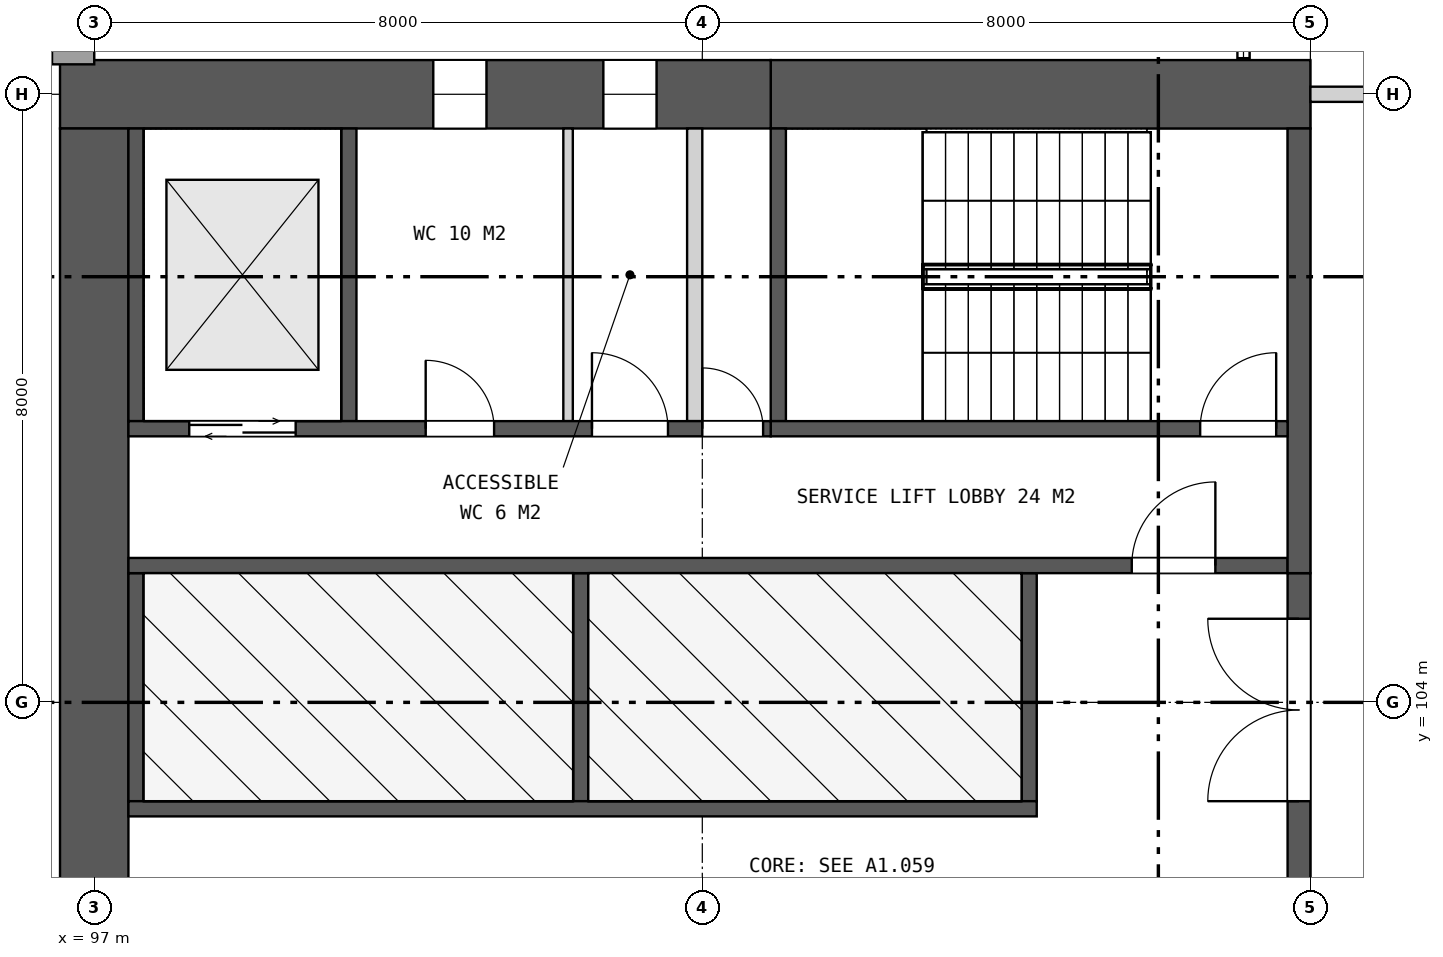
"""IFC4 building model, lengths in metres.
Left out: names, types, materials, properties, quantities, classifications, styles, units other than length and angle.
Written with IfcOpenShell. Run it as: python <this file> out.ifc"""

import sys

from ifc_helpers import new_model, si_unit, direction, frame, frame_2d, origin, place, context, subcontext, project, spatial, rectangle, extrude, element, fill, save


model = new_model("IFC4")
c1 = context("Model", 3, precision=1e-05, world=origin(), true_north=direction((0.0, 1.0)))
c2 = subcontext(c1, "Body", "Model", "MODEL_VIEW")
j1 = project(units=[si_unit("LENGTHUNIT", "METRE"), si_unit("PLANEANGLEUNIT", "RADIAN")], contexts=[c1])
p1 = place(None, origin())
s1 = spatial("IfcSite", under=j1, at=p1, CompositionType="ELEMENT")
p2 = place(p1, origin())
s2 = spatial("IfcBuilding", under=s1, at=p2, CompositionType="ELEMENT")
p3 = place(p2, frame((0.0, 0.0, 10.0)))
s3 = spatial("IfcBuildingStorey", under=s2, at=p3, CompositionType="ELEMENT", Elevation=10.0)
p4 = place(p3, frame((113.0, 112.0, 0.0), z_axis=(0.0, 0.0, 1.0), x_axis=(-1.0, 0.0, 0.0)))
e1 = element("IfcWall", 1, at=p4, inside=s3, PredefinedType="SHEAR", context=c2, shape_type="SweptSolid", body=[
    extrude(rectangle(XDim=7.1, YDim=0.9, at=frame_2d((3.55, 0.0))), origin(), (0.0, 0.0, 1.0), 7.5),
])
p5 = place(p3, frame((105.9, 112.0, 0.0), z_axis=(0.0, 0.0, 1.0), x_axis=(-1.0, 0.0, 0.0)))
e2 = element("IfcWall", 2, at=p5, inside=s3, PredefinedType="SHEAR", context=c2, shape_type="SweptSolid", body=[
    extrude(rectangle(XDim=9.35, YDim=0.9, at=frame_2d((4.675, 0.0))), origin(), (0.0, 0.0, 1.0), 7.5),
])
p6 = place(p5, frame((1.502, 0.0, 1.5)))
e3 = element("IfcOpeningElement", 3, at=p6, cuts=e2, PredefinedType="OPENING", context=c2, shape_type="SweptSolid", body=[
    extrude(rectangle(XDim=0.7, YDim=0.9, at=frame_2d((0.35, 0.45))), frame((0.0, 0.46, 0.0), z_axis=(0.0, -1.0, 0.0), x_axis=(1.0, 0.0, 0.0)), (0.0, 0.0, 1.0), 0.92),
])
p7 = place(p5, frame((3.739, 0.0, 1.5)))
e4 = element("IfcOpeningElement", 4, at=p7, cuts=e2, PredefinedType="OPENING", context=c2, shape_type="SweptSolid", body=[
    extrude(rectangle(XDim=0.7, YDim=0.9, at=frame_2d((0.35, 0.45))), frame((0.0, 0.46, 0.0), z_axis=(0.0, -1.0, 0.0), x_axis=(1.0, 0.0, 0.0)), (0.0, 0.0, 1.0), 0.92),
])
p8 = place(p3, frame((97.0, 111.55, 0.0), z_axis=(0.0, 0.0, 1.0), x_axis=(0.0, -1.0, 0.0)))
e5 = element("IfcWall", 5, at=p8, inside=s3, PredefinedType="SHEAR", context=c2, shape_type="SweptSolid", body=[
    extrude(rectangle(XDim=23.1, YDim=0.9, at=frame_2d((11.55, 0.0))), origin(), (0.0, 0.0, 1.0), 7.5),
])
p9 = place(p8, frame((10.35, 0.0, 0.0)))
e6 = element("IfcOpeningElement", 6, at=p9, cuts=e5, PredefinedType="OPENING", context=c2, shape_type="SweptSolid", body=[
    extrude(rectangle(XDim=2.4, YDim=2.4, at=frame_2d((1.2, 1.2))), frame((0.0, 0.46, 0.0), z_axis=(0.0, -1.0, 0.0), x_axis=(1.0, 0.0, 0.0)), (0.0, 0.0, 1.0), 0.92),
])
p10 = place(p3, frame((112.85, 105.7, 0.0), z_axis=(0.0, 0.0, 1.0), x_axis=(0.0, -1.0, 0.0)))
e7 = element("IfcWall", 7, at=p10, inside=s3, PredefinedType="SHEAR", context=c2, shape_type="SweptSolid", body=[
    extrude(rectangle(XDim=11.4, YDim=0.3, at=frame_2d((5.7, 0.0))), origin(), (0.0, 0.0, 1.0), 7.5),
])
p11 = place(p10, frame((0.6, 0.0, 0.0)))
e8 = element("IfcOpeningElement", 8, at=p11, cuts=e7, PredefinedType="OPENING", context=c2, shape_type="SweptSolid", body=[
    extrude(rectangle(XDim=2.4, YDim=2.4, at=frame_2d((1.2, 1.2))), frame((0.0, 0.16, 0.0), z_axis=(0.0, -1.0, 0.0), x_axis=(1.0, 0.0, 0.0)), (0.0, 0.0, 1.0), 0.32),
])
p12 = place(p10, frame((4.5, 0.0, 0.0)))
e9 = element("IfcOpeningElement", 9, at=p12, cuts=e7, PredefinedType="OPENING", context=c2, shape_type="SweptSolid", body=[
    extrude(rectangle(XDim=2.4, YDim=2.4, at=frame_2d((1.2, 1.2))), frame((0.0, 0.16, 0.0), z_axis=(0.0, -1.0, 0.0), x_axis=(1.0, 0.0, 0.0)), (0.0, 0.0, 1.0), 0.32),
])
p13 = place(p10, frame((8.4, 0.0, 0.0)))
e10 = element("IfcOpeningElement", 10, at=p13, cuts=e7, PredefinedType="OPENING", context=c2, shape_type="SweptSolid", body=[
    extrude(rectangle(XDim=2.4, YDim=2.4, at=frame_2d((1.2, 1.2))), frame((0.0, 0.16, 0.0), z_axis=(0.0, -1.0, 0.0), x_axis=(1.0, 0.0, 0.0)), (0.0, 0.0, 1.0), 0.32),
])
for number, where, z_axis, x_axis in (
    (11, (109.3, 105.7, 0.0), (0.0, 0.0, 1.0), (0.0, -1.0, 0.0)),
    (12, (103.4, 105.7, 0.0), (0.0, 0.0, 1.0), (0.0, -1.0, 0.0)),
    (13, (97.55, 105.7, 0.0), (0.0, 0.0, 1.0), (0.0, -1.0, 0.0)),
):
    element("IfcWall", number, at=place(p3, frame(where, z_axis=z_axis, x_axis=x_axis)), inside=s3, PredefinedType="SHEAR", context=c2, shape_type="SweptSolid", body=[
        extrude(rectangle(XDim=3.0, YDim=0.2, at=frame_2d((1.5, 0.0))), origin(), (0.0, 0.0, 1.0), 7.5),
    ])
p14 = place(p3, frame((109.4, 102.6, 0.0), z_axis=(0.0, 0.0, 1.0), x_axis=(-1.0, 0.0, 0.0)))
e14 = element("IfcWall", 14, at=p14, inside=s3, PredefinedType="SHEAR", context=c2, shape_type="SweptSolid", body=[
    extrude(rectangle(XDim=11.95, YDim=0.2, at=frame_2d((5.975, 0.0))), origin(), (0.0, 0.0, 1.0), 7.5),
])
p15 = place(p3, frame((112.7, 105.8, 0.0), z_axis=(0.0, 0.0, 1.0), x_axis=(-1.0, 0.0, 0.0)))
e15 = element("IfcWall", 15, at=p15, inside=s3, PredefinedType="SHEAR", context=c2, shape_type="SweptSolid", body=[
    extrude(rectangle(XDim=15.25, YDim=0.2, at=frame_2d((7.625, 0.0))), origin(), (0.0, 0.0, 1.0), 7.5),
])
p16 = place(p15, frame((0.95, 0.0, 0.0)))
e16 = element("IfcOpeningElement", 16, at=p16, cuts=e15, PredefinedType="OPENING", context=c2, shape_type="SweptSolid", body=[
    extrude(rectangle(XDim=1.1, YDim=2.1, at=frame_2d((0.55, 1.05))), frame((0.0, 0.11, 0.0), z_axis=(0.0, -1.0, 0.0), x_axis=(1.0, 0.0, 0.0)), (0.0, 0.0, 1.0), 0.22),
])
p17 = place(p3, frame((112.85, 111.55, 0.0), z_axis=(0.0, 0.0, 1.0), x_axis=(0.0, -1.0, 0.0)))
e17 = element("IfcWall", 17, at=p17, inside=s3, PredefinedType="SHEAR", context=c2, shape_type="SweptSolid", body=[
    extrude(rectangle(XDim=5.85, YDim=0.3, at=frame_2d((2.925, 0.0))), origin(), (0.0, 0.0, 1.0), 7.5),
])
for number, where, z_axis, x_axis in (
    (18, (106.0, 111.55, 0.0), (0.0, 0.0, 1.0), (0.0, -1.0, 0.0)),
    (19, (100.35, 111.55, 0.0), (0.0, 0.0, 1.0), (0.0, -1.0, 0.0)),
    (20, (97.55, 111.55, 0.0), (0.0, 0.0, 1.0), (0.0, -1.0, 0.0)),
):
    element("IfcWall", number, at=place(p3, frame(where, z_axis=z_axis, x_axis=x_axis)), inside=s3, PredefinedType="SHEAR", context=c2, shape_type="SweptSolid", body=[
        extrude(rectangle(XDim=3.85, YDim=0.2, at=frame_2d((1.925, 0.0))), origin(), (0.0, 0.0, 1.0), 7.5),
    ])
p18 = place(p3, frame((104.9, 111.55, 0.0), z_axis=(0.0, 0.0, 1.0), x_axis=(0.0, -1.0, 0.0)))
e21 = element("IfcWall", 21, at=p18, inside=s3, PredefinedType="PARTITIONING", context=c2, shape_type="SweptSolid", body=[
    extrude(rectangle(XDim=3.85, YDim=0.2, at=frame_2d((1.925, 0.0))), origin(), (0.0, 0.0, 1.0), 7.5),
])
p19 = place(p3, frame((103.234, 111.55, 0.0), z_axis=(0.0, 0.0, 1.0), x_axis=(0.0, -1.0, 0.0)))
e22 = element("IfcWall", 22, at=p19, inside=s3, PredefinedType="PARTITIONING", context=c2, shape_type="SweptSolid", body=[
    extrude(rectangle(XDim=3.85, YDim=0.125, at=frame_2d((1.925, 0.0))), origin(), (0.0, 0.0, 1.0), 7.5),
])
p20 = place(p3, frame((112.7, 107.6, 0.0), z_axis=(0.0, 0.0, 1.0), x_axis=(-1.0, 0.0, 0.0)))
e23 = element("IfcWall", 23, at=p20, inside=s3, PredefinedType="SHEAR", context=c2, shape_type="SweptSolid", body=[
    extrude(rectangle(XDim=6.8, YDim=0.2, at=frame_2d((3.4, 0.0))), origin(), (0.0, 0.0, 1.0), 7.5),
])
p21 = place(p20, frame((0.15, 0.0, 0.0)))
e24 = element("IfcOpeningElement", 24, at=p21, cuts=e23, PredefinedType="OPENING", context=c2, shape_type="SweptSolid", body=[
    extrude(rectangle(XDim=1.0, YDim=2.1, at=frame_2d((0.5, 1.05))), frame((0.0, 0.11, 0.0), z_axis=(0.0, -1.0, 0.0), x_axis=(1.0, 0.0, 0.0)), (0.0, 0.0, 1.0), 0.22),
])
p22 = place(p3, frame((105.9, 107.6, 0.0), z_axis=(0.0, 0.0, 1.0), x_axis=(-1.0, 0.0, 0.0)))
e25 = element("IfcWall", 25, at=p22, inside=s3, PredefinedType="SHEAR", context=c2, shape_type="SweptSolid", body=[
    extrude(rectangle(XDim=8.45, YDim=0.2, at=frame_2d((4.225, 0.0))), origin(), (0.0, 0.0, 1.0), 7.5),
])
p23 = place(p22, frame((0.1, 0.0, 0.0)))
e26 = element("IfcOpeningElement", 26, at=p23, cuts=e25, PredefinedType="OPENING", context=c2, shape_type="SweptSolid", body=[
    extrude(rectangle(XDim=0.8, YDim=2.1, at=frame_2d((0.4, 1.05))), frame((0.0, 0.11, 0.0), z_axis=(0.0, -1.0, 0.0), x_axis=(1.0, 0.0, 0.0)), (0.0, 0.0, 1.0), 0.22),
])
p24 = place(p22, frame((1.352, 0.0, 0.0)))
e27 = element("IfcOpeningElement", 27, at=p24, cuts=e25, PredefinedType="OPENING", context=c2, shape_type="SweptSolid", body=[
    extrude(rectangle(XDim=1.0, YDim=2.1, at=frame_2d((0.5, 1.05))), frame((0.0, 0.11, 0.0), z_axis=(0.0, -1.0, 0.0), x_axis=(1.0, 0.0, 0.0)), (0.0, 0.0, 1.0), 0.22),
])
p25 = place(p22, frame((3.639, 0.0, 0.0)))
e28 = element("IfcOpeningElement", 28, at=p25, cuts=e25, PredefinedType="OPENING", context=c2, shape_type="SweptSolid", body=[
    extrude(rectangle(XDim=0.9, YDim=2.1, at=frame_2d((0.45, 1.05))), frame((0.0, 0.11, 0.0), z_axis=(0.0, -1.0, 0.0), x_axis=(1.0, 0.0, 0.0)), (0.0, 0.0, 1.0), 0.22),
])
p26 = place(p22, frame((6.25, 0.0, 0.0)))
e29 = element("IfcOpeningElement", 29, at=p26, cuts=e25, PredefinedType="OPENING", context=c2, shape_type="SweptSolid", body=[
    extrude(rectangle(XDim=1.4, YDim=2.1, at=frame_2d((0.7, 1.05))), frame((0.0, 0.11, 0.0), z_axis=(0.0, -1.0, 0.0), x_axis=(1.0, 0.0, 0.0)), (0.0, 0.0, 1.0), 0.22),
])
p27 = place(p3, frame((96.445, 112.597, 0.0), z_axis=(0.0, 0.0, 1.0), x_axis=(1.0, 0.0, 0.0)))
e30 = element("IfcWall", 30, at=p27, inside=s3, PredefinedType="SOLIDWALL", context=c2, shape_type="SweptSolid", body=[
    extrude(rectangle(XDim=0.555, YDim=0.406, at=frame_2d((0.277, 0.0))), origin(), (0.0, 0.0, 1.0), 7.1),
])
p28 = place(p3, frame((113.0, 112.0, 0.0), z_axis=(0.0, 0.0, 1.0), x_axis=(1.0, 0.0, 0.0)))
e31 = element("IfcWall", 31, at=p28, inside=s3, PredefinedType="PARTITIONING", context=c2, shape_type="SweptSolid", body=[
    extrude(rectangle(XDim=7.4, YDim=0.2, at=frame_2d((3.7, 0.0))), origin(), (0.0, 0.0, 1.0), 6.551),
])
p29 = place(p28, frame((2.8, 0.0, 0.0)))
e32 = element("IfcOpeningElement", 32, at=p29, cuts=e31, PredefinedType="OPENING", context=c2, shape_type="SweptSolid", body=[
    extrude(rectangle(XDim=2.4, YDim=2.4, at=frame_2d((1.2, 1.2))), frame((0.0, 0.11, 0.0), z_axis=(0.0, -1.0, 0.0), x_axis=(1.0, 0.0, 0.0)), (0.0, 0.0, 1.0), 0.22),
])
p30 = place(p6, origin())
e33 = element("IfcWindow", 33, at=p30, inside=s3, PartitioningType="SINGLE_PANEL", PredefinedType="WINDOW", context=c2, shape_type="SweptSolid", body=[
    extrude(rectangle(XDim=0.7, YDim=0.9, at=frame_2d((0.35, 0.45))), frame((0.0, 0.03, 0.0), z_axis=(0.0, -1.0, 0.0), x_axis=(1.0, 0.0, 0.0)), (0.0, 0.0, 1.0), 0.06),
])
fill(e3, e33)
p31 = place(p7, origin())
e34 = element("IfcWindow", 34, at=p31, inside=s3, PartitioningType="SINGLE_PANEL", PredefinedType="WINDOW", context=c2, shape_type="SweptSolid", body=[
    extrude(rectangle(XDim=0.7, YDim=0.9, at=frame_2d((0.35, 0.45))), frame((0.0, 0.03, 0.0), z_axis=(0.0, -1.0, 0.0), x_axis=(1.0, 0.0, 0.0)), (0.0, 0.0, 1.0), 0.06),
])
fill(e4, e34)
p32 = place(p11, frame((2.4, 0.0, 0.0), z_axis=(0.0, 0.0, 1.0), x_axis=(-1.0, 0.0, 0.0)))
e35 = element("IfcDoor", 35, at=p32, inside=s3, OperationType="DOUBLE_DOOR_SINGLE_SWING", PredefinedType="DOOR", context=c2, shape_type="SweptSolid", body=[
    extrude(rectangle(XDim=2.4, YDim=2.4, at=frame_2d((1.2, 1.2))), frame((0.0, 0.025, 0.0), z_axis=(0.0, -1.0, 0.0), x_axis=(1.0, 0.0, 0.0)), (0.0, 0.0, 1.0), 0.05),
])
fill(e8, e35)
p33 = place(p16, frame((1.1, 0.0, 0.0), z_axis=(0.0, 0.0, 1.0), x_axis=(-1.0, 0.0, 0.0)))
e36 = element("IfcDoor", 36, at=p33, inside=s3, OperationType="SINGLE_SWING_RIGHT", PredefinedType="DOOR", context=c2, shape_type="SweptSolid", body=[
    extrude(rectangle(XDim=1.1, YDim=2.1, at=frame_2d((0.55, 1.05))), frame((0.0, 0.025, 0.0), z_axis=(0.0, -1.0, 0.0), x_axis=(1.0, 0.0, 0.0)), (0.0, 0.0, 1.0), 0.05),
])
fill(e16, e36)
p34 = place(p21, frame((1.0, 0.0, 0.0), z_axis=(0.0, 0.0, 1.0), x_axis=(-1.0, 0.0, 0.0)))
e37 = element("IfcDoor", 37, at=p34, inside=s3, OperationType="SINGLE_SWING_RIGHT", PredefinedType="DOOR", context=c2, shape_type="SweptSolid", body=[
    extrude(rectangle(XDim=1.0, YDim=2.1, at=frame_2d((0.5, 1.05))), frame((0.0, 0.025, 0.0), z_axis=(0.0, -1.0, 0.0), x_axis=(1.0, 0.0, 0.0)), (0.0, 0.0, 1.0), 0.05),
])
fill(e24, e37)
p35 = place(p23, frame((0.8, 0.0, 0.0), z_axis=(0.0, 0.0, 1.0), x_axis=(-1.0, 0.0, 0.0)))
e38 = element("IfcDoor", 38, at=p35, inside=s3, OperationType="SINGLE_SWING_LEFT", PredefinedType="DOOR", context=c2, shape_type="SweptSolid", body=[
    extrude(rectangle(XDim=0.8, YDim=2.1, at=frame_2d((0.4, 1.05))), frame((0.0, 0.025, 0.0), z_axis=(0.0, -1.0, 0.0), x_axis=(1.0, 0.0, 0.0)), (0.0, 0.0, 1.0), 0.05),
])
fill(e26, e38)
p36 = place(p24, frame((1.0, 0.0, 0.0), z_axis=(0.0, 0.0, 1.0), x_axis=(-1.0, 0.0, 0.0)))
e39 = element("IfcDoor", 39, at=p36, inside=s3, OperationType="SINGLE_SWING_LEFT", PredefinedType="DOOR", context=c2, shape_type="SweptSolid", body=[
    extrude(rectangle(XDim=1.0, YDim=2.1, at=frame_2d((0.5, 1.05))), frame((0.0, 0.025, 0.0), z_axis=(0.0, -1.0, 0.0), x_axis=(1.0, 0.0, 0.0)), (0.0, 0.0, 1.0), 0.05),
])
fill(e27, e39)
p37 = place(p25, frame((0.9, 0.0, 0.0), z_axis=(0.0, 0.0, 1.0), x_axis=(-1.0, 0.0, 0.0)))
e40 = element("IfcDoor", 40, at=p37, inside=s3, OperationType="SINGLE_SWING_LEFT", PredefinedType="DOOR", context=c2, shape_type="SweptSolid", body=[
    extrude(rectangle(XDim=0.9, YDim=2.1, at=frame_2d((0.45, 1.05))), frame((0.0, 0.025, 0.0), z_axis=(0.0, -1.0, 0.0), x_axis=(1.0, 0.0, 0.0)), (0.0, 0.0, 1.0), 0.05),
])
fill(e28, e40)
p38 = place(p26, origin())
e41 = element("IfcDoor", 41, at=p38, inside=s3, OperationType="DOUBLE_DOOR_SLIDING", PredefinedType="DOOR", context=c2, shape_type="SweptSolid", body=[
    extrude(rectangle(XDim=1.4, YDim=2.1, at=frame_2d((0.7, 1.05))), frame((0.0, 0.025, 0.0), z_axis=(0.0, -1.0, 0.0), x_axis=(1.0, 0.0, 0.0)), (0.0, 0.0, 1.0), 0.05),
])
fill(e29, e41)
save(model, sys.argv[1])
